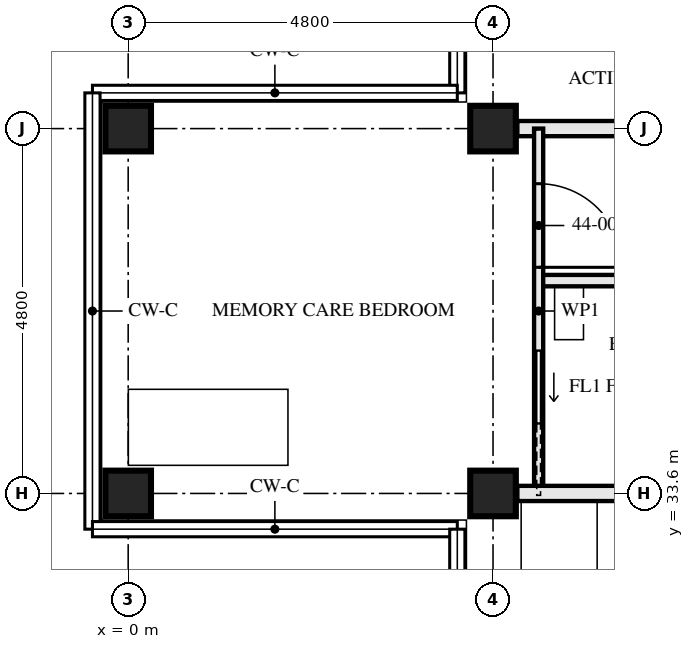
"""IFC4 building model, lengths in metres.
Left out: names, types, materials, properties, quantities, classifications, styles, units other than length and angle.
Written with IfcOpenShell. Run it as: python <this file> out.ifc"""

import sys

from ifc_helpers import new_model, si_unit, direction, frame, frame_2d, origin, origin_2d, place, context, subcontext, project, spatial, rectangle, hollow_rectangle, extrude, element, fill, save


model = new_model("IFC4")
c1 = context("Model", 3, precision=1e-05, world=origin(), true_north=direction((0.0, 1.0)))
c2 = subcontext(c1, "Body", "Model", "MODEL_VIEW")
j1 = project(units=[si_unit("LENGTHUNIT", "METRE"), si_unit("PLANEANGLEUNIT", "RADIAN")], contexts=[c1])
p1 = place(None, origin())
s1 = spatial("IfcSite", under=j1, at=p1, CompositionType="ELEMENT")
p2 = place(p1, origin())
s2 = spatial("IfcBuilding", under=s1, at=p2, CompositionType="ELEMENT")
p3 = place(p2, frame((0.0, 0.0, 162.0)))
s3 = spatial("IfcBuildingStorey", under=s2, at=p3, CompositionType="ELEMENT", Elevation=162.0)
for number, where, z_axis, x_axis in (
    (1, (0.0, 33.6, 0.0), (0.0, 0.0, 1.0), (0.0, 1.0, 0.0)),
    (2, (0.0, 38.4, 0.0), (0.0, 0.0, 1.0), (0.0, 1.0, 0.0)),
    (3, (4.8, 33.6, 0.0), (0.0, 0.0, 1.0), (0.0, 1.0, 0.0)),
    (4, (4.8, 38.4, 0.0), (0.0, 0.0, 1.0), (0.0, 1.0, 0.0)),
):
    element("IfcColumn", number, at=place(p3, frame(where, z_axis=z_axis, x_axis=x_axis)), inside=s3, PredefinedType="COLUMN", context=c2, shape_type="SweptSolid", body=[
        extrude(hollow_rectangle(XDim=0.6, YDim=0.6, WallThickness=0.06, at=origin_2d()), origin(), (0.0, 0.0, 1.0), 3.5),
    ])
p4 = place(p3, frame((5.12, 38.4, 0.0), z_axis=(0.0, 0.0, 1.0), x_axis=(1.0, 0.0, 0.0)))
e5 = element("IfcWall", 5, at=p4, inside=s3, PredefinedType="PARTITIONING", context=c2, shape_type="SweptSolid", body=[
    extrude(rectangle(XDim=7.28, YDim=0.2, at=frame_2d((3.64, 0.0))), origin(), (0.0, 0.0, 1.0), 2.55),
])
p5 = place(p3, frame((5.4, 36.4, 0.0), z_axis=(0.0, 0.0, 1.0), x_axis=(1.0, 0.0, 0.0)))
e6 = element("IfcWall", 6, at=p5, inside=s3, PredefinedType="PARTITIONING", context=c2, shape_type="SweptSolid", body=[
    extrude(rectangle(XDim=3.0, YDim=0.15, at=frame_2d((1.5, 0.0))), origin(), (0.0, 0.0, 1.0), 3.33),
])
p6 = place(p3, frame((5.4, 38.4, 0.0), z_axis=(0.0, 0.0, 1.0), x_axis=(0.0, -1.0, 0.0)))
e7 = element("IfcWall", 7, at=p6, inside=s3, PredefinedType="PARTITIONING", context=c2, shape_type="SweptSolid", body=[
    extrude(rectangle(XDim=4.8, YDim=0.12, at=frame_2d((2.4, 0.0))), origin(), (0.0, 0.0, 1.0), 3.33),
])
p7 = place(p6, frame((0.725, 0.0, 0.0)))
e8 = element("IfcOpeningElement", 8, at=p7, cuts=e7, PredefinedType="OPENING", context=c2, shape_type="SweptSolid", body=[
    extrude(rectangle(XDim=1.1, YDim=2.1, at=frame_2d((0.55, 1.05))), frame((0.0, 0.071, 0.0), z_axis=(0.0, -1.0, 0.0), x_axis=(1.0, 0.0, 0.0)), (0.0, 0.0, 1.0), 0.141),
])
p8 = place(p6, frame((2.925, 0.0, 0.0)))
e9 = element("IfcOpeningElement", 9, at=p8, cuts=e7, PredefinedType="OPENING", context=c2, shape_type="SweptSolid", body=[
    extrude(rectangle(XDim=0.95, YDim=2.1, at=frame_2d((0.475, 1.05))), frame((0.0, 0.071, 0.0), z_axis=(0.0, -1.0, 0.0), x_axis=(1.0, 0.0, 0.0)), (0.0, 0.0, 1.0), 0.141),
])
p9 = place(p3, frame((5.12, 33.6, 0.0), z_axis=(0.0, 0.0, 1.0), x_axis=(1.0, 0.0, 0.0)))
e10 = element("IfcWall", 10, at=p9, inside=s3, PredefinedType="PARTITIONING", context=c2, shape_type="SweptSolid", body=[
    extrude(rectangle(XDim=7.28, YDim=0.2, at=frame_2d((3.64, 0.0))), origin(), (0.0, 0.0, 1.0), 2.55),
])
p10 = place(p7, origin())
e11 = element("IfcDoor", 11, at=p10, inside=s3, OperationType="SINGLE_SWING_LEFT", PredefinedType="DOOR", context=c2, shape_type="SweptSolid", body=[
    extrude(rectangle(XDim=1.1, YDim=2.1, at=frame_2d((0.55, 1.05))), frame((0.0, 0.022, 0.0), z_axis=(0.0, -1.0, 0.0), x_axis=(1.0, 0.0, 0.0)), (0.0, 0.0, 1.0), 0.044),
])
fill(e8, e11)
p11 = place(p8, origin())
e12 = element("IfcDoor", 12, at=p11, inside=s3, OperationType="SLIDING_TO_LEFT", PredefinedType="DOOR", context=c2, shape_type="SweptSolid", body=[
    extrude(rectangle(XDim=0.95, YDim=2.1, at=frame_2d((0.475, 1.05))), frame((0.0, 0.022, 0.0), z_axis=(0.0, -1.0, 0.0), x_axis=(1.0, 0.0, 0.0)), (0.0, 0.0, 1.0), 0.044),
])
fill(e9, e12)
save(model, sys.argv[1])
